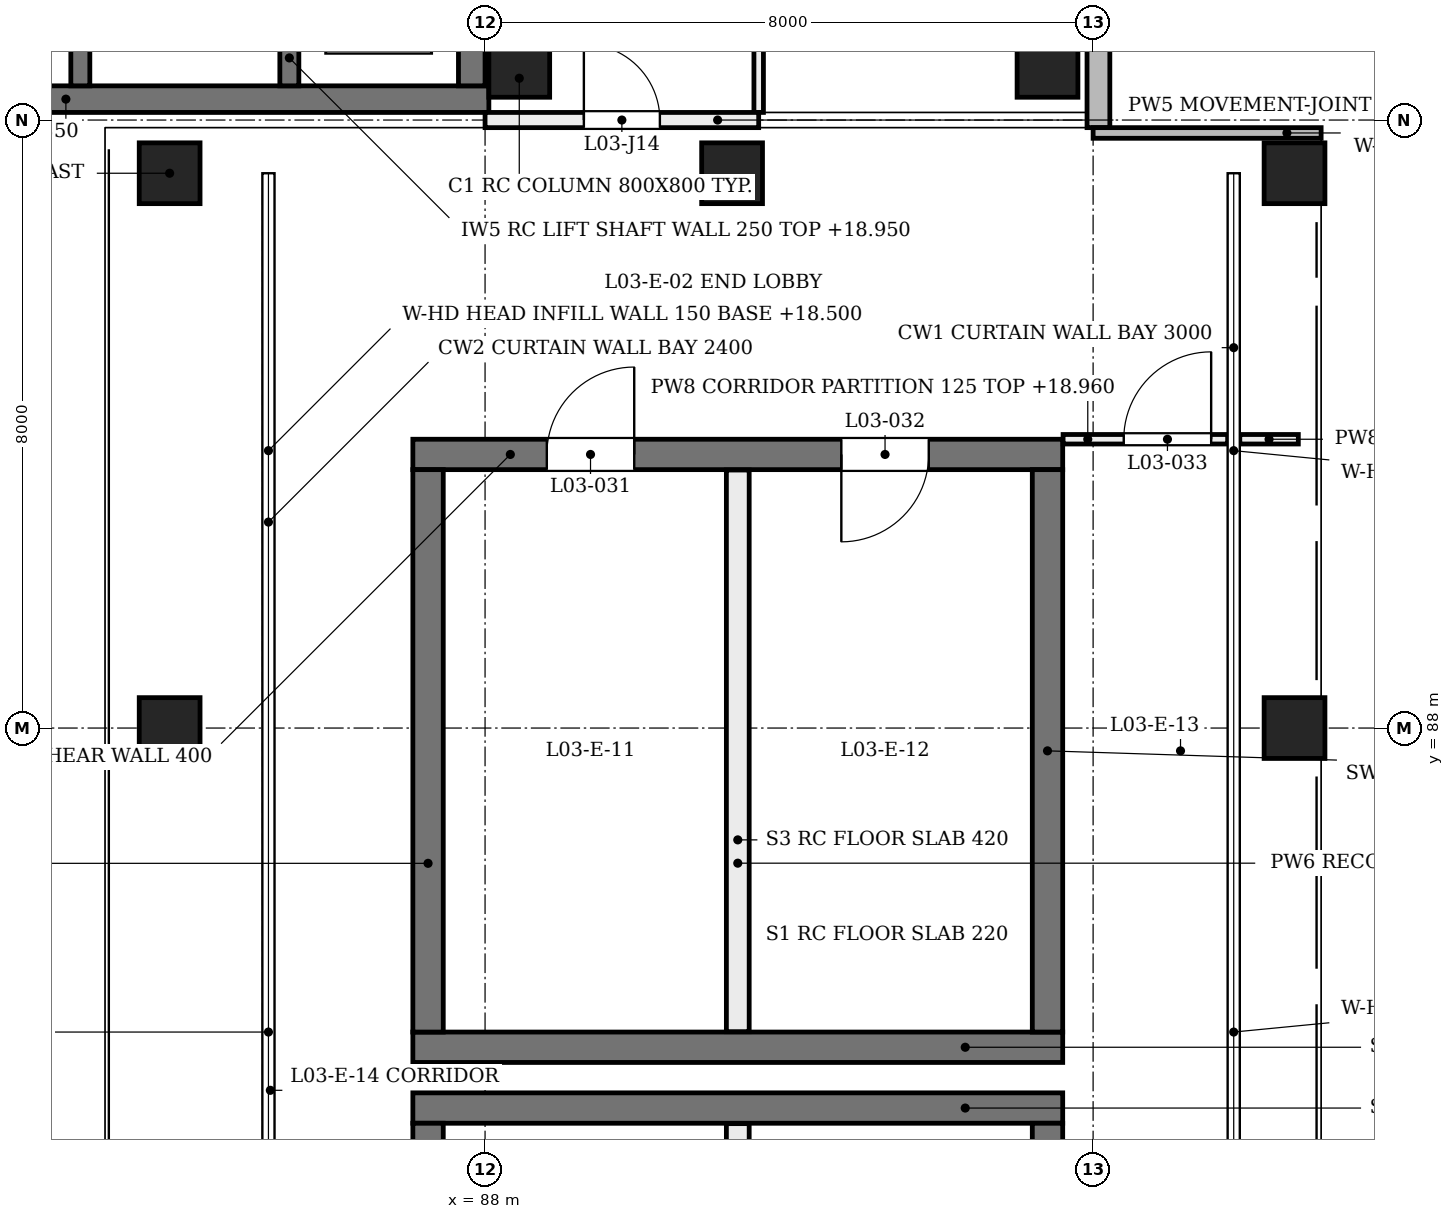
"""IFC4 building model, lengths in metres.
Left out: names, types, materials, properties, quantities, classifications, styles, units other than length and angle.
Written with IfcOpenShell. Run it as: python <this file> out.ifc"""

import sys

from ifc_helpers import new_model, si_unit, direction, frame, frame_2d, origin, origin_2d, place, context, subcontext, project, spatial, rectangle, extrude, element, fill, save


model = new_model("IFC4")
c1 = context("Model", 3, precision=1e-05, world=origin(), true_north=direction((0.0, 1.0)))
c2 = subcontext(c1, "Body", "Model", "MODEL_VIEW")
j1 = project(units=[si_unit("LENGTHUNIT", "METRE"), si_unit("PLANEANGLEUNIT", "RADIAN")], contexts=[c1])
p1 = place(None, origin())
s1 = spatial("IfcSite", under=j1, at=p1, CompositionType="ELEMENT")
p2 = place(p1, origin())
s2 = spatial("IfcBuilding", under=s1, at=p2, CompositionType="ELEMENT")
p3 = place(p2, frame((0.0, 0.0, 14.4)))
s3 = spatial("IfcBuildingStorey", under=s2, at=p3, CompositionType="ELEMENT", Elevation=14.4)
p4 = place(p3, frame((87.05, 83.0, 0.0), z_axis=(0.0, 0.0, 1.0), x_axis=(1.0, 0.0, 0.0)))
e1 = element("IfcWall", 1, at=p4, inside=s3, PredefinedType="SHEAR", context=c2, shape_type="SweptSolid", body=[
    extrude(rectangle(XDim=8.55, YDim=0.4, at=frame_2d((4.275, 0.0))), origin(), (0.0, 0.0, 1.0), 4.58),
])
p5 = place(p3, frame((87.25, 75.8, 0.0), z_axis=(0.0, 0.0, 1.0), x_axis=(0.0, 1.0, 0.0)))
e2 = element("IfcWall", 2, at=p5, inside=s3, PredefinedType="SHEAR", context=c2, shape_type="SweptSolid", body=[
    extrude(rectangle(XDim=7.0, YDim=0.4, at=frame_2d((3.5, 0.0))), origin(), (0.0, 0.0, 1.0), 4.58),
])
p6 = place(p5, frame((3.026, 0.0, 0.0)))
e3 = element("IfcOpeningElement", 3, at=p6, cuts=e2, PredefinedType="OPENING", context=c2, shape_type="SweptSolid", body=[
    extrude(rectangle(XDim=1.15, YDim=2.2, at=frame_2d((0.575, 1.1))), frame((0.0, 0.21, 0.0), z_axis=(0.0, -1.0, 0.0), x_axis=(1.0, 0.0, 0.0)), (0.0, 0.0, 1.0), 0.42),
])
p7 = place(p3, frame((95.4, 75.8, 0.0), z_axis=(0.0, 0.0, 1.0), x_axis=(0.0, 1.0, 0.0)))
e4 = element("IfcWall", 4, at=p7, inside=s3, PredefinedType="SHEAR", context=c2, shape_type="SweptSolid", body=[
    extrude(rectangle(XDim=7.0, YDim=0.4, at=frame_2d((3.5, 0.0))), origin(), (0.0, 0.0, 1.0), 4.58),
])
p8 = place(p7, frame((3.104, 0.0, 0.0)))
e5 = element("IfcOpeningElement", 5, at=p8, cuts=e4, PredefinedType="OPENING", context=c2, shape_type="SweptSolid", body=[
    extrude(rectangle(XDim=1.0, YDim=2.1, at=frame_2d((0.5, 1.05))), frame((0.0, 0.21, 0.0), z_axis=(0.0, -1.0, 0.0), x_axis=(1.0, 0.0, 0.0)), (0.0, 0.0, 1.0), 0.42),
])
p9 = place(p3, frame((87.05, 83.8, 0.0), z_axis=(0.0, 0.0, 1.0), x_axis=(1.0, 0.0, 0.0)))
e6 = element("IfcWall", 6, at=p9, inside=s3, PredefinedType="SHEAR", context=c2, shape_type="SweptSolid", body=[
    extrude(rectangle(XDim=8.55, YDim=0.4, at=frame_2d((4.275, 0.0))), origin(), (0.0, 0.0, 1.0), 4.58),
])
p10 = place(p3, frame((87.05, 91.6, 0.0), z_axis=(0.0, 0.0, 1.0), x_axis=(1.0, 0.0, 0.0)))
e7 = element("IfcWall", 7, at=p10, inside=s3, PredefinedType="SHEAR", context=c2, shape_type="SweptSolid", body=[
    extrude(rectangle(XDim=8.55, YDim=0.4, at=frame_2d((4.275, 0.0))), origin(), (0.0, 0.0, 1.0), 4.58),
])
p11 = place(p10, frame((1.762, 0.0, 0.0)))
e8 = element("IfcOpeningElement", 8, at=p11, cuts=e7, PredefinedType="OPENING", context=c2, shape_type="SweptSolid", body=[
    extrude(rectangle(XDim=1.15, YDim=2.2, at=frame_2d((0.575, 1.1))), frame((0.0, 0.21, 0.0), z_axis=(0.0, -1.0, 0.0), x_axis=(1.0, 0.0, 0.0)), (0.0, 0.0, 1.0), 0.42),
])
p12 = place(p10, frame((5.637, 0.0, 0.0)))
e9 = element("IfcOpeningElement", 9, at=p12, cuts=e7, PredefinedType="OPENING", context=c2, shape_type="SweptSolid", body=[
    extrude(rectangle(XDim=1.15, YDim=2.2, at=frame_2d((0.575, 1.1))), frame((0.0, 0.21, 0.0), z_axis=(0.0, -1.0, 0.0), x_axis=(1.0, 0.0, 0.0)), (0.0, 0.0, 1.0), 0.42),
])
for number, where, z_axis, x_axis in (
    (10, (87.25, 84.0, 0.0), (0.0, 0.0, 1.0), (0.0, 1.0, 0.0)),
    (11, (95.4, 84.0, 0.0), (0.0, 0.0, 1.0), (0.0, 1.0, 0.0)),
):
    element("IfcWall", number, at=place(p3, frame(where, z_axis=z_axis, x_axis=x_axis)), inside=s3, PredefinedType="SHEAR", context=c2, shape_type="SweptSolid", body=[
        extrude(rectangle(XDim=7.4, YDim=0.4, at=frame_2d((3.7, 0.0))), origin(), (0.0, 0.0, 1.0), 4.58),
    ])
p13 = place(p3, frame((80.1, 96.275, 0.0), z_axis=(0.0, 0.0, 1.0), x_axis=(1.0, 0.0, 0.0)))
e12 = element("IfcWall", 12, at=p13, inside=s3, PredefinedType="SHEAR", context=c2, shape_type="SweptSolid", body=[
    extrude(rectangle(XDim=7.95, YDim=0.35, at=frame_2d((3.975, 0.0))), origin(), (0.0, 0.0, 1.0), 4.58),
])
p14 = place(p3, frame((87.825, 96.45, 0.0), z_axis=(0.0, 0.0, 1.0), x_axis=(0.0, 1.0, 0.0)))
e13 = element("IfcWall", 13, at=p14, inside=s3, PredefinedType="SHEAR", context=c2, shape_type="SweptSolid", body=[
    extrude(rectangle(XDim=15.2, YDim=0.35, at=frame_2d((7.6, 0.0))), origin(), (0.0, 0.0, 1.0), 4.58),
])
p15 = place(p14, frame((13.25, 0.0, 0.0)))
e14 = element("IfcOpeningElement", 14, at=p15, cuts=e13, PredefinedType="OPENING", context=c2, shape_type="SweptSolid", body=[
    extrude(rectangle(XDim=1.0, YDim=2.1, at=frame_2d((0.5, 1.05))), frame((0.0, 0.185, 0.0), z_axis=(0.0, -1.0, 0.0), x_axis=(1.0, 0.0, 0.0)), (0.0, 0.0, 1.0), 0.37),
])
p16 = place(p14, frame((3.2, 0.0, 0.0)))
e15 = element("IfcOpeningElement", 15, at=p16, cuts=e13, PredefinedType="OPENING", context=c2, shape_type="SweptSolid", body=[
    extrude(rectangle(XDim=1.4, YDim=2.1, at=frame_2d((0.7, 1.05))), frame((0.0, 0.185, 0.0), z_axis=(0.0, -1.0, 0.0), x_axis=(1.0, 0.0, 0.0)), (0.0, 0.0, 1.0), 0.37),
])
for number, where, z_axis, x_axis in (
    (16, (88.45, 96.7, 0.0), (0.0, 0.0, 1.0), (1.0, 0.0, 0.0)),
    (17, (95.4, 96.7, 0.0), (0.0, 0.0, 1.0), (1.0, 0.0, 0.0)),
):
    element("IfcColumn", number, at=place(p3, frame(where, z_axis=z_axis, x_axis=x_axis)), inside=s3, PredefinedType="COLUMN", context=c2, shape_type="SweptSolid", body=[
        extrude(rectangle(XDim=0.8, YDim=0.8, at=origin_2d()), origin(), (0.0, 0.0, 1.0), 4.8),
    ])
for number, where, z_axis, x_axis in (
    (18, (83.6, 88.0, 0.0), (0.204, 0.0, 0.979), (0.0, 1.0, 0.0)),
    (19, (83.6, 95.3, 0.0), (0.204, 0.0, 0.979), (0.0, 1.0, 0.0)),
    (20, (91.0, 95.3, 0.0), (0.204, 0.0, 0.979), (0.0, 1.0, 0.0)),
    (21, (98.4, 88.0, 0.0), (0.204, 0.0, 0.979), (0.0, 1.0, 0.0)),
    (22, (98.4, 95.3, 0.0), (0.204, 0.0, 0.979), (0.0, 1.0, 0.0)),
):
    element("IfcColumn", number, at=place(p3, frame(where, z_axis=z_axis, x_axis=x_axis)), inside=s3, PredefinedType="COLUMN", context=c2, shape_type="SweptSolid", body=[
        extrude(rectangle(XDim=0.8, YDim=0.8, at=origin_2d()), origin(), (0.0, 0.0, 1.0), 4.903),
    ])
p17 = place(p3, frame((97.85, 80.2, 4.1), z_axis=(0.0, 0.0, 1.0), x_axis=(0.0, 1.0, 0.0)))
e23 = element("IfcWall", 23, at=p17, inside=s3, PredefinedType="SOLIDWALL", context=c2, shape_type="SweptSolid", body=[
    extrude(rectangle(XDim=7.6, YDim=0.15, at=frame_2d((3.8, 0.0))), origin(), (0.0, 0.0, 1.0), 0.48),
])
p18 = place(p3, frame((97.85, 88.2, 4.1), z_axis=(0.0, 0.0, 1.0), x_axis=(0.0, 1.0, 0.0)))
e24 = element("IfcWall", 24, at=p18, inside=s3, PredefinedType="SOLIDWALL", context=c2, shape_type="SweptSolid", body=[
    extrude(rectangle(XDim=6.9, YDim=0.15, at=frame_2d((3.45, 0.0))), origin(), (0.0, 0.0, 1.0), 0.48),
])
p19 = place(p3, frame((85.15, 80.2, 4.1), z_axis=(0.0, 0.0, 1.0), x_axis=(0.0, 1.0, 0.0)))
e25 = element("IfcWall", 25, at=p19, inside=s3, PredefinedType="SOLIDWALL", context=c2, shape_type="SweptSolid", body=[
    extrude(rectangle(XDim=7.6, YDim=0.15, at=frame_2d((3.8, 0.0))), origin(), (0.0, 0.0, 1.0), 0.48),
])
p20 = place(p3, frame((85.15, 88.2, 4.1), z_axis=(0.0, 0.0, 1.0), x_axis=(0.0, 1.0, 0.0)))
e26 = element("IfcWall", 26, at=p20, inside=s3, PredefinedType="SOLIDWALL", context=c2, shape_type="SweptSolid", body=[
    extrude(rectangle(XDim=6.9, YDim=0.15, at=frame_2d((3.45, 0.0))), origin(), (0.0, 0.0, 1.0), 0.48),
])
p21 = place(p3, frame((96.07, 95.9, 0.0), z_axis=(0.0, 0.0, 1.0), x_axis=(0.0, 1.0, 0.0)))
e27 = element("IfcWall", 27, at=p21, inside=s3, PredefinedType="SOLIDWALL", context=c2, shape_type="SweptSolid", body=[
    extrude(rectangle(XDim=16.4, YDim=0.3, at=frame_2d((8.2, 0.0))), origin(), (0.0, 0.0, 1.0), 3.9),
])
p22 = place(p21, frame((1.1, 0.0, 0.75)))
e28 = element("IfcOpeningElement", 28, at=p22, cuts=e27, PredefinedType="OPENING", context=c2, shape_type="SweptSolid", body=[
    extrude(rectangle(XDim=0.9, YDim=3.1, at=frame_2d((0.45, 1.55))), frame((0.0, 0.16, 0.0), z_axis=(0.0, -1.0, 0.0), x_axis=(1.0, 0.0, 0.0)), (0.0, 0.0, 1.0), 0.32),
])
p23 = place(p21, frame((3.8, 0.0, 0.75)))
e29 = element("IfcOpeningElement", 29, at=p23, cuts=e27, PredefinedType="OPENING", context=c2, shape_type="SweptSolid", body=[
    extrude(rectangle(XDim=0.9, YDim=3.1, at=frame_2d((0.45, 1.55))), frame((0.0, 0.16, 0.0), z_axis=(0.0, -1.0, 0.0), x_axis=(1.0, 0.0, 0.0)), (0.0, 0.0, 1.0), 0.32),
])
p24 = place(p21, frame((6.5, 0.0, 0.75)))
e30 = element("IfcOpeningElement", 30, at=p24, cuts=e27, PredefinedType="OPENING", context=c2, shape_type="SweptSolid", body=[
    extrude(rectangle(XDim=0.9, YDim=3.1, at=frame_2d((0.45, 1.55))), frame((0.0, 0.16, 0.0), z_axis=(0.0, -1.0, 0.0), x_axis=(1.0, 0.0, 0.0)), (0.0, 0.0, 1.0), 0.32),
])
p25 = place(p21, frame((9.2, 0.0, 0.75)))
e31 = element("IfcOpeningElement", 31, at=p25, cuts=e27, PredefinedType="OPENING", context=c2, shape_type="SweptSolid", body=[
    extrude(rectangle(XDim=0.9, YDim=3.1, at=frame_2d((0.45, 1.55))), frame((0.0, 0.16, 0.0), z_axis=(0.0, -1.0, 0.0), x_axis=(1.0, 0.0, 0.0)), (0.0, 0.0, 1.0), 0.32),
])
p26 = place(p21, frame((11.9, 0.0, 0.75)))
e32 = element("IfcOpeningElement", 32, at=p26, cuts=e27, PredefinedType="OPENING", context=c2, shape_type="SweptSolid", body=[
    extrude(rectangle(XDim=0.9, YDim=3.1, at=frame_2d((0.45, 1.55))), frame((0.0, 0.16, 0.0), z_axis=(0.0, -1.0, 0.0), x_axis=(1.0, 0.0, 0.0)), (0.0, 0.0, 1.0), 0.32),
])
p27 = place(p21, frame((14.6, 0.0, 0.75)))
e33 = element("IfcOpeningElement", 33, at=p27, cuts=e27, PredefinedType="OPENING", context=c2, shape_type="SweptSolid", body=[
    extrude(rectangle(XDim=0.9, YDim=3.1, at=frame_2d((0.45, 1.55))), frame((0.0, 0.16, 0.0), z_axis=(0.0, -1.0, 0.0), x_axis=(1.0, 0.0, 0.0)), (0.0, 0.0, 1.0), 0.32),
])
p28 = place(p3, frame((96.0, 95.83, 0.0), z_axis=(0.0, 0.0, 1.0), x_axis=(1.0, 0.0, 0.0)))
e34 = element("IfcWall", 34, at=p28, inside=s3, PredefinedType="SOLIDWALL", context=c2, shape_type="SweptSolid", body=[
    extrude(rectangle(XDim=3.0, YDim=0.14, at=frame_2d((1.5, 0.0))), origin(), (0.0, 0.0, 1.0), 3.9),
])
for number, where, z_axis, x_axis in (
    (35, (85.425, 98.9, 0.0), (0.0, 0.0, 1.0), (0.0, -1.0, 0.0)),
    (36, (82.675, 98.9, 0.0), (0.0, 0.0, 1.0), (0.0, -1.0, 0.0)),
):
    element("IfcWall", number, at=place(p3, frame(where, z_axis=z_axis, x_axis=x_axis)), inside=s3, PredefinedType="SOLIDWALL", context=c2, shape_type="SweptSolid", body=[
        extrude(rectangle(XDim=2.45, YDim=0.25, at=frame_2d((1.225, 0.0))), origin(), (0.0, 0.0, 1.0), 4.55),
    ])
p29 = place(p3, frame((95.605, 91.8, 0.0), z_axis=(0.0, 0.0, 1.0), x_axis=(1.0, 0.0, 0.0)))
e37 = element("IfcWall", 37, at=p29, inside=s3, PredefinedType="PARTITIONING", context=c2, shape_type="SweptSolid", body=[
    extrude(rectangle(XDim=2.165, YDim=0.125, at=frame_2d((1.083, 0.0))), origin(), (0.0, 0.0, 1.0), 4.56),
])
p30 = place(p29, frame((0.798, 0.0, 0.0)))
e38 = element("IfcOpeningElement", 38, at=p30, cuts=e37, PredefinedType="OPENING", context=c2, shape_type="SweptSolid", body=[
    extrude(rectangle(XDim=1.15, YDim=2.1, at=frame_2d((0.575, 1.05))), frame((0.0, 0.073, 0.0), z_axis=(0.0, -1.0, 0.0), x_axis=(1.0, 0.0, 0.0)), (0.0, 0.0, 1.0), 0.145),
])
p31 = place(p3, frame((97.93, 91.8, 0.0), z_axis=(0.0, 0.0, 1.0), x_axis=(1.0, 0.0, 0.0)))
e39 = element("IfcWall", 39, at=p31, inside=s3, PredefinedType="PARTITIONING", context=c2, shape_type="SweptSolid", body=[
    extrude(rectangle(XDim=0.77, YDim=0.125, at=frame_2d((0.385, 0.0))), origin(), (0.0, 0.0, 1.0), 4.56),
])
p32 = place(p3, frame((91.325, 75.805, 0.0), z_axis=(0.0, 0.0, 1.0), x_axis=(0.0, 1.0, 0.0)))
e40 = element("IfcWall", 40, at=p32, inside=s3, PredefinedType="PARTITIONING", context=c2, shape_type="SweptSolid", body=[
    extrude(rectangle(XDim=6.99, YDim=0.3, at=frame_2d((3.495, 0.0))), origin(), (0.0, 0.0, 1.0), 3.98),
])
p33 = place(p32, frame((2.92, 0.0, 0.0)))
e41 = element("IfcOpeningElement", 41, at=p33, cuts=e40, PredefinedType="OPENING", context=c2, shape_type="SweptSolid", body=[
    extrude(rectangle(XDim=1.15, YDim=2.2, at=frame_2d((0.575, 1.1))), frame((0.0, 0.16, 0.0), z_axis=(0.0, -1.0, 0.0), x_axis=(1.0, 0.0, 0.0)), (0.0, 0.0, 1.0), 0.32),
])
p34 = place(p3, frame((91.325, 84.005, 0.0), z_axis=(0.0, 0.0, 1.0), x_axis=(0.0, 1.0, 0.0)))
e42 = element("IfcWall", 42, at=p34, inside=s3, PredefinedType="PARTITIONING", context=c2, shape_type="SweptSolid", body=[
    extrude(rectangle(XDim=7.39, YDim=0.3, at=frame_2d((3.695, 0.0))), origin(), (0.0, 0.0, 1.0), 3.98),
])
p35 = place(p3, frame((91.6, 96.1, 0.0), z_axis=(0.0, 0.0, 1.0), x_axis=(0.0, 1.0, 0.0)))
e43 = element("IfcWall", 43, at=p35, inside=s3, PredefinedType="PARTITIONING", context=c2, shape_type="SweptSolid", body=[
    extrude(rectangle(XDim=8.958, YDim=0.125, at=frame_2d((4.479, 0.0))), origin(), (0.0, 0.0, 1.0), 3.88),
])
p36 = place(p35, frame((1.233, 0.0, 0.0)))
e44 = element("IfcOpeningElement", 44, at=p36, cuts=e43, PredefinedType="OPENING", context=c2, shape_type="SweptSolid", body=[
    extrude(rectangle(XDim=0.9, YDim=2.1, at=frame_2d((0.45, 1.05))), frame((0.0, 0.073, 0.0), z_axis=(0.0, -1.0, 0.0), x_axis=(1.0, 0.0, 0.0)), (0.0, 0.0, 1.0), 0.145),
])
p37 = place(p3, frame((88.0, 96.0, 0.0), z_axis=(0.0, 0.0, 1.0), x_axis=(1.0, 0.0, 0.0)))
e45 = element("IfcWall", 45, at=p37, inside=s3, PredefinedType="PARTITIONING", context=c2, shape_type="SweptSolid", body=[
    extrude(rectangle(XDim=3.6, YDim=0.2, at=frame_2d((1.8, 0.0))), origin(), (0.0, 0.0, 1.0), 3.88),
])
p38 = place(p37, frame((1.3, 0.0, 0.0)))
e46 = element("IfcOpeningElement", 46, at=p38, cuts=e45, PredefinedType="OPENING", context=c2, shape_type="SweptSolid", body=[
    extrude(rectangle(XDim=1.0, YDim=2.1, at=frame_2d((0.5, 1.05))), frame((0.0, 0.11, 0.0), z_axis=(0.0, -1.0, 0.0), x_axis=(1.0, 0.0, 0.0)), (0.0, 0.0, 1.0), 0.22),
])
p39 = place(p11, frame((1.15, 0.0, 0.0), z_axis=(0.0, 0.0, 1.0), x_axis=(-1.0, 0.0, 0.0)))
e47 = element("IfcDoor", 47, at=p39, inside=s3, OperationType="SINGLE_SWING_RIGHT", PredefinedType="DOOR", context=c2, shape_type="SweptSolid", body=[
    extrude(rectangle(XDim=1.15, YDim=2.2, at=frame_2d((0.575, 1.1))), frame((0.0, 0.025, 0.0), z_axis=(0.0, -1.0, 0.0), x_axis=(1.0, 0.0, 0.0)), (0.0, 0.0, 1.0), 0.05),
])
fill(e8, e47)
p40 = place(p12, frame((1.15, 0.0, 0.0), z_axis=(0.0, 0.0, 1.0), x_axis=(-1.0, 0.0, 0.0)))
e48 = element("IfcDoor", 48, at=p40, inside=s3, OperationType="SINGLE_SWING_LEFT", PredefinedType="DOOR", context=c2, shape_type="SweptSolid", body=[
    extrude(rectangle(XDim=1.15, YDim=2.2, at=frame_2d((0.575, 1.1))), frame((0.0, 0.025, 0.0), z_axis=(0.0, -1.0, 0.0), x_axis=(1.0, 0.0, 0.0)), (0.0, 0.0, 1.0), 0.05),
])
fill(e9, e48)
p41 = place(p30, frame((1.15, 0.0, 0.0), z_axis=(0.0, 0.0, 1.0), x_axis=(-1.0, 0.0, 0.0)))
e49 = element("IfcDoor", 49, at=p41, inside=s3, OperationType="SINGLE_SWING_RIGHT", PredefinedType="DOOR", context=c2, shape_type="SweptSolid", body=[
    extrude(rectangle(XDim=1.15, YDim=2.1, at=frame_2d((0.575, 1.05))), frame((0.0, 0.025, 0.0), z_axis=(0.0, -1.0, 0.0), x_axis=(1.0, 0.0, 0.0)), (0.0, 0.0, 1.0), 0.05),
])
fill(e38, e49)
p42 = place(p38, origin())
e50 = element("IfcDoor", 50, at=p42, inside=s3, OperationType="SINGLE_SWING_LEFT", PredefinedType="DOOR", context=c2, shape_type="SweptSolid", body=[
    extrude(rectangle(XDim=1.0, YDim=2.1, at=frame_2d((0.5, 1.05))), frame((0.0, 0.025, 0.0), z_axis=(0.0, -1.0, 0.0), x_axis=(1.0, 0.0, 0.0)), (0.0, 0.0, 1.0), 0.05),
])
fill(e46, e50)
save(model, sys.argv[1])
